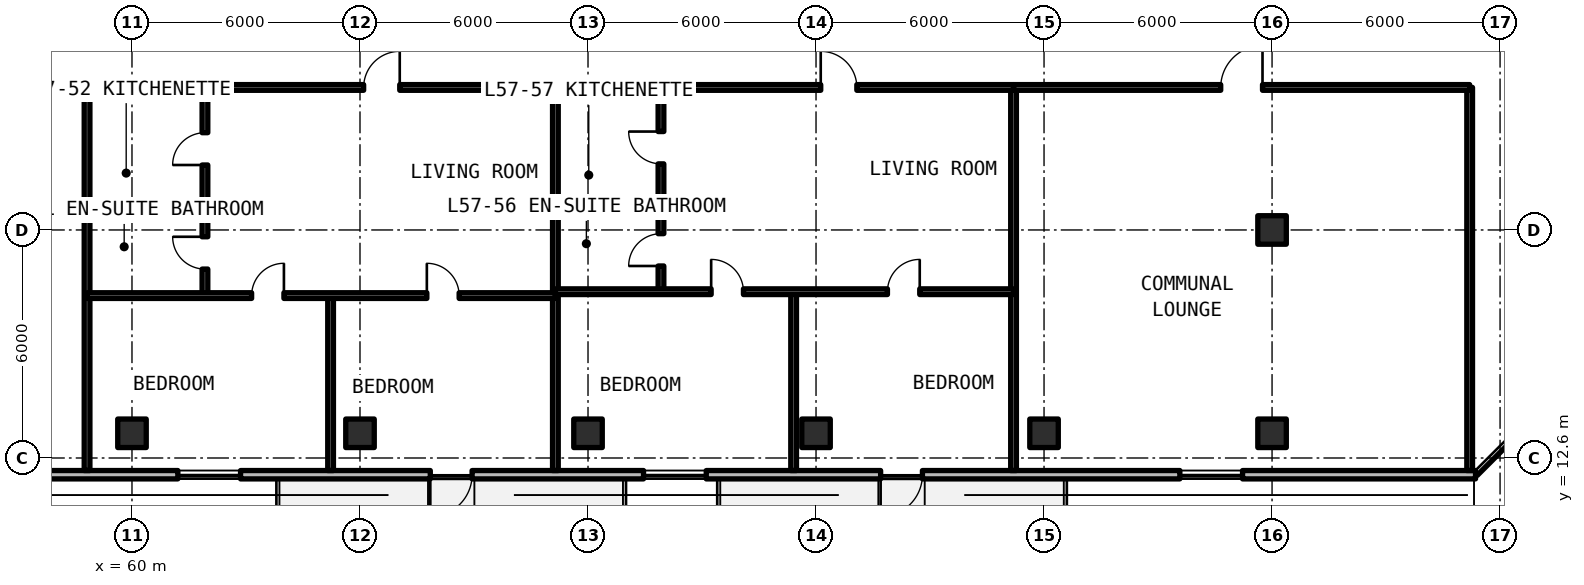
"""IFC4 building model, lengths in metres.
Left out: names, types, materials, properties, quantities, classifications, styles, units other than length and angle.
Written with IfcOpenShell. Run it as: python <this file> out.ifc"""

import sys

from ifc_helpers import new_model, si_unit, direction, frame, frame_2d, origin, origin_2d, place, context, subcontext, project, spatial, rectangle, extrude, element, fill, save


model = new_model("IFC4")
c1 = context("Model", 3, precision=1e-05, world=origin(), true_north=direction((0.0, 1.0)))
c2 = subcontext(c1, "Body", "Model", "MODEL_VIEW")
j1 = project(units=[si_unit("LENGTHUNIT", "METRE"), si_unit("PLANEANGLEUNIT", "RADIAN")], contexts=[c1])
p1 = place(None, origin())
s1 = spatial("IfcSite", under=j1, at=p1, CompositionType="ELEMENT")
p2 = place(p1, origin())
s2 = spatial("IfcBuilding", under=s1, at=p2, CompositionType="ELEMENT")
p3 = place(p2, frame((0.0, 0.0, 204.93)))
s3 = spatial("IfcBuildingStorey", under=s2, at=p3, CompositionType="ELEMENT", Elevation=204.93)
for number, where, z_axis, x_axis in (
    (1, (90.0, 18.6, 0.0), (0.0, 0.0, 1.0), (1.0, 0.0, 0.0)),
    (2, (60.0, 13.25, 0.0), (0.0, 0.0, 1.0), (1.0, 0.0, 0.0)),
    (3, (66.0, 13.25, 0.0), (0.0, 0.0, 1.0), (1.0, 0.0, 0.0)),
    (4, (72.0, 13.25, 0.0), (0.0, 0.0, 1.0), (1.0, 0.0, 0.0)),
    (5, (78.0, 13.25, 0.0), (0.0, 0.0, 1.0), (1.0, 0.0, 0.0)),
    (6, (84.0, 13.25, 0.0), (0.0, 0.0, 1.0), (1.0, 0.0, 0.0)),
    (7, (90.0, 13.25, 0.0), (0.0, 0.0, 1.0), (1.0, 0.0, 0.0)),
):
    element("IfcColumn", number, at=place(p3, frame(where, z_axis=z_axis, x_axis=x_axis)), inside=s3, PredefinedType="COLUMN", context=c2, shape_type="SweptSolid", body=[
        extrude(rectangle(XDim=0.75, YDim=0.75, at=origin_2d()), origin(), (0.0, 0.0, 1.0), 3.3),
    ])
p4 = place(p3, frame((52.11, 12.16, 0.0), z_axis=(0.0, 0.0, 1.0), x_axis=(1.0, 0.0, 0.0)))
e8 = element("IfcWall", 8, at=p4, inside=s3, PredefinedType="SOLIDWALL", context=c2, shape_type="SweptSolid", body=[
    extrude(rectangle(XDim=43.244, YDim=0.22, at=frame_2d((21.622, 0.0))), origin(), (0.0, 0.0, 1.0), 3.08),
])
p5 = place(p4, frame((15.74, 0.0, 0.0)))
e9 = element("IfcOpeningElement", 9, at=p5, cuts=e8, PredefinedType="OPENING", context=c2, shape_type="SweptSolid", body=[
    extrude(rectangle(XDim=1.1, YDim=2.15, at=frame_2d((0.55, 1.075))), frame((0.0, 0.12, 0.0), z_axis=(0.0, -1.0, 0.0), x_axis=(1.0, 0.0, 0.0)), (0.0, 0.0, 1.0), 0.24),
])
p6 = place(p4, frame((27.59, 0.0, 0.0)))
e10 = element("IfcOpeningElement", 10, at=p6, cuts=e8, PredefinedType="OPENING", context=c2, shape_type="SweptSolid", body=[
    extrude(rectangle(XDim=1.1, YDim=2.15, at=frame_2d((0.55, 1.075))), frame((0.0, 0.12, 0.0), z_axis=(0.0, -1.0, 0.0), x_axis=(1.0, 0.0, 0.0)), (0.0, 0.0, 1.0), 0.24),
])
p7 = place(p4, frame((2.694, 0.0, 0.78)))
e11 = element("IfcOpeningElement", 11, at=p7, cuts=e8, PredefinedType="OPENING", context=c2, shape_type="SweptSolid", body=[
    extrude(rectangle(XDim=1.65, YDim=1.66, at=frame_2d((0.825, 0.83))), frame((0.0, 0.12, 0.0), z_axis=(0.0, -1.0, 0.0), x_axis=(1.0, 0.0, 0.0)), (0.0, 0.0, 1.0), 0.24),
])
p8 = place(p4, frame((9.097, 0.0, 0.78)))
e12 = element("IfcOpeningElement", 12, at=p8, cuts=e8, PredefinedType="OPENING", context=c2, shape_type="SweptSolid", body=[
    extrude(rectangle(XDim=1.65, YDim=1.66, at=frame_2d((0.825, 0.83))), frame((0.0, 0.12, 0.0), z_axis=(0.0, -1.0, 0.0), x_axis=(1.0, 0.0, 0.0)), (0.0, 0.0, 1.0), 0.24),
])
p9 = place(p4, frame((21.351, 0.0, 0.78)))
e13 = element("IfcOpeningElement", 13, at=p9, cuts=e8, PredefinedType="OPENING", context=c2, shape_type="SweptSolid", body=[
    extrude(rectangle(XDim=1.65, YDim=1.66, at=frame_2d((0.825, 0.83))), frame((0.0, 0.12, 0.0), z_axis=(0.0, -1.0, 0.0), x_axis=(1.0, 0.0, 0.0)), (0.0, 0.0, 1.0), 0.24),
])
p10 = place(p4, frame((35.464, 0.0, 0.78)))
e14 = element("IfcOpeningElement", 14, at=p10, cuts=e8, PredefinedType="OPENING", context=c2, shape_type="SweptSolid", body=[
    extrude(rectangle(XDim=1.65, YDim=1.66, at=frame_2d((0.825, 0.83))), frame((0.0, 0.12, 0.0), z_axis=(0.0, -1.0, 0.0), x_axis=(1.0, 0.0, 0.0)), (0.0, 0.0, 1.0), 0.24),
])
for number, where, z_axis, x_axis in (
    (15, (95.2, 12.27, 0.0), (0.0, 0.0, 1.0), (0.0, 1.0, 0.0)),
    (16, (58.818, 12.27, 0.0), (0.0, 0.0, 1.0), (0.0, 1.0, 0.0)),
):
    element("IfcWall", number, at=place(p3, frame(where, z_axis=z_axis, x_axis=x_axis)), inside=s3, PredefinedType="SOLIDWALL", context=c2, shape_type="SweptSolid", body=[
        extrude(rectangle(XDim=10.08, YDim=0.15, at=frame_2d((5.04, 0.0))), origin(), (0.0, 0.0, 1.0), 2.35),
    ])
p11 = place(p3, frame((52.12, 22.35, 0.0), z_axis=(0.0, 0.0, 1.0), x_axis=(1.0, 0.0, 0.0)))
e17 = element("IfcWall", 17, at=p11, inside=s3, PredefinedType="SOLIDWALL", context=c2, shape_type="SweptSolid", body=[
    extrude(rectangle(XDim=6.698, YDim=0.15, at=frame_2d((3.349, 0.0))), origin(), (0.0, 0.0, 1.0), 2.35),
])
p12 = place(p11, frame((2.874, 0.0, 0.0)))
e18 = element("IfcOpeningElement", 18, at=p12, cuts=e17, PredefinedType="OPENING", context=c2, shape_type="SweptSolid", body=[
    extrude(rectangle(XDim=0.95, YDim=2.15, at=frame_2d((0.475, 1.075))), frame((0.0, 0.085, 0.0), z_axis=(0.0, -1.0, 0.0), x_axis=(1.0, 0.0, 0.0)), (0.0, 0.0, 1.0), 0.17),
])
p13 = place(p3, frame((71.142, 12.27, 0.0), z_axis=(0.0, 0.0, 1.0), x_axis=(0.0, 1.0, 0.0)))
e19 = element("IfcWall", 19, at=p13, inside=s3, PredefinedType="SOLIDWALL", context=c2, shape_type="SweptSolid", body=[
    extrude(rectangle(XDim=10.08, YDim=0.15, at=frame_2d((5.04, 0.0))), origin(), (0.0, 0.0, 1.0), 2.35),
])
p14 = place(p3, frame((58.818, 19.119, 0.0), z_axis=(0.0, 0.0, 1.0), x_axis=(1.0, 0.0, 0.0)))
e20 = element("IfcWall", 20, at=p14, inside=s3, PredefinedType="PARTITIONING", context=c2, shape_type="SweptSolid", body=[
    extrude(rectangle(XDim=3.102, YDim=0.15, at=frame_2d((1.551, 0.0))), origin(), (0.0, 0.0, 1.0), 2.35),
])
p15 = place(p3, frame((61.92, 16.873, 0.0), z_axis=(0.0, 0.0, 1.0), x_axis=(0.0, 1.0, 0.0)))
e21 = element("IfcWall", 21, at=p15, inside=s3, PredefinedType="PARTITIONING", context=c2, shape_type="SweptSolid", body=[
    extrude(rectangle(XDim=5.477, YDim=0.15, at=frame_2d((2.738, 0.0))), origin(), (0.0, 0.0, 1.0), 2.35),
])
p16 = place(p15, frame((0.698, 0.0, 0.0)))
e22 = element("IfcOpeningElement", 22, at=p16, cuts=e21, PredefinedType="OPENING", context=c2, shape_type="SweptSolid", body=[
    extrude(rectangle(XDim=0.85, YDim=2.1, at=frame_2d((0.425, 1.05))), frame((0.0, 0.085, 0.0), z_axis=(0.0, -1.0, 0.0), x_axis=(1.0, 0.0, 0.0)), (0.0, 0.0, 1.0), 0.17),
])
p17 = place(p15, frame((3.436, 0.0, 0.0)))
e23 = element("IfcOpeningElement", 23, at=p17, cuts=e21, PredefinedType="OPENING", context=c2, shape_type="SweptSolid", body=[
    extrude(rectangle(XDim=0.85, YDim=2.1, at=frame_2d((0.425, 1.05))), frame((0.0, 0.085, 0.0), z_axis=(0.0, -1.0, 0.0), x_axis=(1.0, 0.0, 0.0)), (0.0, 0.0, 1.0), 0.17),
])
p18 = place(p3, frame((65.226, 12.27, 0.0), z_axis=(0.0, 0.0, 1.0), x_axis=(0.0, 1.0, 0.0)))
e24 = element("IfcWall", 24, at=p18, inside=s3, PredefinedType="PARTITIONING", context=c2, shape_type="SweptSolid", body=[
    extrude(rectangle(XDim=4.603, YDim=0.15, at=frame_2d((2.302, 0.0))), origin(), (0.0, 0.0, 1.0), 2.35),
])
p19 = place(p3, frame((58.818, 16.873, 0.0), z_axis=(0.0, 0.0, 1.0), x_axis=(1.0, 0.0, 0.0)))
e25 = element("IfcWall", 25, at=p19, inside=s3, PredefinedType="PARTITIONING", context=c2, shape_type="SweptSolid", body=[
    extrude(rectangle(XDim=12.324, YDim=0.15, at=frame_2d((6.162, 0.0))), origin(), (0.0, 0.0, 1.0), 2.35),
])
p20 = place(p19, frame((4.33, 0.0, 0.0)))
e26 = element("IfcOpeningElement", 26, at=p20, cuts=e25, PredefinedType="OPENING", context=c2, shape_type="SweptSolid", body=[
    extrude(rectangle(XDim=0.85, YDim=2.1, at=frame_2d((0.425, 1.05))), frame((0.0, 0.085, 0.0), z_axis=(0.0, -1.0, 0.0), x_axis=(1.0, 0.0, 0.0)), (0.0, 0.0, 1.0), 0.17),
])
p21 = place(p19, frame((8.941, 0.0, 0.0)))
e27 = element("IfcOpeningElement", 27, at=p21, cuts=e25, PredefinedType="OPENING", context=c2, shape_type="SweptSolid", body=[
    extrude(rectangle(XDim=0.85, YDim=2.1, at=frame_2d((0.425, 1.05))), frame((0.0, 0.085, 0.0), z_axis=(0.0, -1.0, 0.0), x_axis=(1.0, 0.0, 0.0)), (0.0, 0.0, 1.0), 0.17),
])
p22 = place(p3, frame((58.818, 22.35, 0.0), z_axis=(0.0, 0.0, 1.0), x_axis=(1.0, 0.0, 0.0)))
e28 = element("IfcWall", 28, at=p22, inside=s3, PredefinedType="SOLIDWALL", context=c2, shape_type="SweptSolid", body=[
    extrude(rectangle(XDim=12.324, YDim=0.15, at=frame_2d((6.162, 0.0))), origin(), (0.0, 0.0, 1.0), 2.35),
])
p23 = place(p22, frame((7.278, 0.0, 0.0)))
e29 = element("IfcOpeningElement", 29, at=p23, cuts=e28, PredefinedType="OPENING", context=c2, shape_type="SweptSolid", body=[
    extrude(rectangle(XDim=0.95, YDim=2.15, at=frame_2d((0.475, 1.075))), frame((0.0, 0.085, 0.0), z_axis=(0.0, -1.0, 0.0), x_axis=(1.0, 0.0, 0.0)), (0.0, 0.0, 1.0), 0.17),
])
p24 = place(p3, frame((83.198, 12.27, 0.0), z_axis=(0.0, 0.0, 1.0), x_axis=(0.0, 1.0, 0.0)))
e30 = element("IfcWall", 30, at=p24, inside=s3, PredefinedType="SOLIDWALL", context=c2, shape_type="SweptSolid", body=[
    extrude(rectangle(XDim=10.08, YDim=0.15, at=frame_2d((5.04, 0.0))), origin(), (0.0, 0.0, 1.0), 2.35),
])
p25 = place(p3, frame((71.142, 19.179, 0.0), z_axis=(0.0, 0.0, 1.0), x_axis=(1.0, 0.0, 0.0)))
e31 = element("IfcWall", 31, at=p25, inside=s3, PredefinedType="PARTITIONING", context=c2, shape_type="SweptSolid", body=[
    extrude(rectangle(XDim=2.778, YDim=0.15, at=frame_2d((1.389, 0.0))), origin(), (0.0, 0.0, 1.0), 2.35),
])
p26 = place(p3, frame((73.92, 16.976, 0.0), z_axis=(0.0, 0.0, 1.0), x_axis=(0.0, 1.0, 0.0)))
e32 = element("IfcWall", 32, at=p26, inside=s3, PredefinedType="PARTITIONING", context=c2, shape_type="SweptSolid", body=[
    extrude(rectangle(XDim=5.375, YDim=0.15, at=frame_2d((2.687, 0.0))), origin(), (0.0, 0.0, 1.0), 2.35),
])
p27 = place(p26, frame((0.677, 0.0, 0.0)))
e33 = element("IfcOpeningElement", 33, at=p27, cuts=e32, PredefinedType="OPENING", context=c2, shape_type="SweptSolid", body=[
    extrude(rectangle(XDim=0.85, YDim=2.1, at=frame_2d((0.425, 1.05))), frame((0.0, 0.085, 0.0), z_axis=(0.0, -1.0, 0.0), x_axis=(1.0, 0.0, 0.0)), (0.0, 0.0, 1.0), 0.17),
])
p28 = place(p26, frame((3.364, 0.0, 0.0)))
e34 = element("IfcOpeningElement", 34, at=p28, cuts=e32, PredefinedType="OPENING", context=c2, shape_type="SweptSolid", body=[
    extrude(rectangle(XDim=0.85, YDim=2.1, at=frame_2d((0.425, 1.05))), frame((0.0, 0.085, 0.0), z_axis=(0.0, -1.0, 0.0), x_axis=(1.0, 0.0, 0.0)), (0.0, 0.0, 1.0), 0.17),
])
p29 = place(p3, frame((77.411, 12.27, 0.0), z_axis=(0.0, 0.0, 1.0), x_axis=(0.0, 1.0, 0.0)))
e35 = element("IfcWall", 35, at=p29, inside=s3, PredefinedType="PARTITIONING", context=c2, shape_type="SweptSolid", body=[
    extrude(rectangle(XDim=4.706, YDim=0.15, at=frame_2d((2.353, 0.0))), origin(), (0.0, 0.0, 1.0), 2.35),
])
p30 = place(p3, frame((71.142, 16.976, 0.0), z_axis=(0.0, 0.0, 1.0), x_axis=(1.0, 0.0, 0.0)))
e36 = element("IfcWall", 36, at=p30, inside=s3, PredefinedType="PARTITIONING", context=c2, shape_type="SweptSolid", body=[
    extrude(rectangle(XDim=12.056, YDim=0.15, at=frame_2d((6.028, 0.0))), origin(), (0.0, 0.0, 1.0), 2.35),
])
p31 = place(p30, frame((4.099, 0.0, 0.0)))
e37 = element("IfcOpeningElement", 37, at=p31, cuts=e36, PredefinedType="OPENING", context=c2, shape_type="SweptSolid", body=[
    extrude(rectangle(XDim=0.85, YDim=2.1, at=frame_2d((0.425, 1.05))), frame((0.0, 0.085, 0.0), z_axis=(0.0, -1.0, 0.0), x_axis=(1.0, 0.0, 0.0)), (0.0, 0.0, 1.0), 0.17),
])
p32 = place(p30, frame((8.738, 0.0, 0.0)))
e38 = element("IfcOpeningElement", 38, at=p32, cuts=e36, PredefinedType="OPENING", context=c2, shape_type="SweptSolid", body=[
    extrude(rectangle(XDim=0.85, YDim=2.1, at=frame_2d((0.425, 1.05))), frame((0.0, 0.085, 0.0), z_axis=(0.0, -1.0, 0.0), x_axis=(1.0, 0.0, 0.0)), (0.0, 0.0, 1.0), 0.17),
])
p33 = place(p3, frame((71.142, 22.35, 0.0), z_axis=(0.0, 0.0, 1.0), x_axis=(1.0, 0.0, 0.0)))
e39 = element("IfcWall", 39, at=p33, inside=s3, PredefinedType="SOLIDWALL", context=c2, shape_type="SweptSolid", body=[
    extrude(rectangle(XDim=12.056, YDim=0.15, at=frame_2d((6.028, 0.0))), origin(), (0.0, 0.0, 1.0), 2.35),
])
p34 = place(p33, frame((6.982, 0.0, 0.0)))
e40 = element("IfcOpeningElement", 40, at=p34, cuts=e39, PredefinedType="OPENING", context=c2, shape_type="SweptSolid", body=[
    extrude(rectangle(XDim=0.95, YDim=2.15, at=frame_2d((0.475, 1.075))), frame((0.0, 0.085, 0.0), z_axis=(0.0, -1.0, 0.0), x_axis=(1.0, 0.0, 0.0)), (0.0, 0.0, 1.0), 0.17),
])
p35 = place(p3, frame((83.198, 22.35, 0.0), z_axis=(0.0, 0.0, 1.0), x_axis=(1.0, 0.0, 0.0)))
e41 = element("IfcWall", 41, at=p35, inside=s3, PredefinedType="SOLIDWALL", context=c2, shape_type="SweptSolid", body=[
    extrude(rectangle(XDim=12.002, YDim=0.15, at=frame_2d((6.001, 0.0))), origin(), (0.0, 0.0, 1.0), 2.35),
])
p36 = place(p35, frame((5.451, 0.0, 0.0)))
e42 = element("IfcOpeningElement", 42, at=p36, cuts=e41, PredefinedType="OPENING", context=c2, shape_type="SweptSolid", body=[
    extrude(rectangle(XDim=1.1, YDim=2.15, at=frame_2d((0.55, 1.075))), frame((0.0, 0.085, 0.0), z_axis=(0.0, -1.0, 0.0), x_axis=(1.0, 0.0, 0.0)), (0.0, 0.0, 1.0), 0.17),
])
p37 = place(p5, frame((1.1, 0.0, 0.0), z_axis=(0.0, 0.0, 1.0), x_axis=(-1.0, 0.0, 0.0)))
e43 = element("IfcDoor", 43, at=p37, inside=s3, OperationType="SINGLE_SWING_RIGHT", PredefinedType="DOOR", context=c2, shape_type="SweptSolid", body=[
    extrude(rectangle(XDim=1.1, YDim=2.15, at=frame_2d((0.55, 1.075))), frame((0.0, 0.025, 0.0), z_axis=(0.0, -1.0, 0.0), x_axis=(1.0, 0.0, 0.0)), (0.0, 0.0, 1.0), 0.05),
])
fill(e9, e43)
p38 = place(p6, frame((1.1, 0.0, 0.0), z_axis=(0.0, 0.0, 1.0), x_axis=(-1.0, 0.0, 0.0)))
e44 = element("IfcDoor", 44, at=p38, inside=s3, OperationType="SINGLE_SWING_LEFT", PredefinedType="DOOR", context=c2, shape_type="SweptSolid", body=[
    extrude(rectangle(XDim=1.1, YDim=2.15, at=frame_2d((0.55, 1.075))), frame((0.0, 0.025, 0.0), z_axis=(0.0, -1.0, 0.0), x_axis=(1.0, 0.0, 0.0)), (0.0, 0.0, 1.0), 0.05),
])
fill(e10, e44)
p39 = place(p8, origin())
e45 = element("IfcWindow", 45, at=p39, inside=s3, PartitioningType="SINGLE_PANEL", PredefinedType="WINDOW", context=c2, shape_type="SweptSolid", body=[
    extrude(rectangle(XDim=1.65, YDim=1.66, at=frame_2d((0.825, 0.83))), frame((0.0, 0.03, 0.0), z_axis=(0.0, -1.0, 0.0), x_axis=(1.0, 0.0, 0.0)), (0.0, 0.0, 1.0), 0.06),
])
fill(e12, e45)
p40 = place(p9, origin())
e46 = element("IfcWindow", 46, at=p40, inside=s3, PartitioningType="SINGLE_PANEL", PredefinedType="WINDOW", context=c2, shape_type="SweptSolid", body=[
    extrude(rectangle(XDim=1.65, YDim=1.66, at=frame_2d((0.825, 0.83))), frame((0.0, 0.03, 0.0), z_axis=(0.0, -1.0, 0.0), x_axis=(1.0, 0.0, 0.0)), (0.0, 0.0, 1.0), 0.06),
])
fill(e13, e46)
p41 = place(p10, origin())
e47 = element("IfcWindow", 47, at=p41, inside=s3, PartitioningType="SINGLE_PANEL", PredefinedType="WINDOW", context=c2, shape_type="SweptSolid", body=[
    extrude(rectangle(XDim=1.65, YDim=1.66, at=frame_2d((0.825, 0.83))), frame((0.0, 0.03, 0.0), z_axis=(0.0, -1.0, 0.0), x_axis=(1.0, 0.0, 0.0)), (0.0, 0.0, 1.0), 0.06),
])
fill(e14, e47)
p42 = place(p16, origin())
e48 = element("IfcDoor", 48, at=p42, inside=s3, OperationType="SINGLE_SWING_RIGHT", PredefinedType="DOOR", context=c2, shape_type="SweptSolid", body=[
    extrude(rectangle(XDim=0.85, YDim=2.1, at=frame_2d((0.425, 1.05))), frame((0.0, 0.025, 0.0), z_axis=(0.0, -1.0, 0.0), x_axis=(1.0, 0.0, 0.0)), (0.0, 0.0, 1.0), 0.05),
])
fill(e22, e48)
p43 = place(p17, origin())
e49 = element("IfcDoor", 49, at=p43, inside=s3, OperationType="SINGLE_SWING_LEFT", PredefinedType="DOOR", context=c2, shape_type="SweptSolid", body=[
    extrude(rectangle(XDim=0.85, YDim=2.1, at=frame_2d((0.425, 1.05))), frame((0.0, 0.025, 0.0), z_axis=(0.0, -1.0, 0.0), x_axis=(1.0, 0.0, 0.0)), (0.0, 0.0, 1.0), 0.05),
])
fill(e23, e49)
p44 = place(p20, origin())
e50 = element("IfcDoor", 50, at=p44, inside=s3, OperationType="SINGLE_SWING_RIGHT", PredefinedType="DOOR", context=c2, shape_type="SweptSolid", body=[
    extrude(rectangle(XDim=0.85, YDim=2.1, at=frame_2d((0.425, 1.05))), frame((0.0, 0.025, 0.0), z_axis=(0.0, -1.0, 0.0), x_axis=(1.0, 0.0, 0.0)), (0.0, 0.0, 1.0), 0.05),
])
fill(e26, e50)
p45 = place(p21, origin())
e51 = element("IfcDoor", 51, at=p45, inside=s3, OperationType="SINGLE_SWING_LEFT", PredefinedType="DOOR", context=c2, shape_type="SweptSolid", body=[
    extrude(rectangle(XDim=0.85, YDim=2.1, at=frame_2d((0.425, 1.05))), frame((0.0, 0.025, 0.0), z_axis=(0.0, -1.0, 0.0), x_axis=(1.0, 0.0, 0.0)), (0.0, 0.0, 1.0), 0.05),
])
fill(e27, e51)
p46 = place(p23, origin())
e52 = element("IfcDoor", 52, at=p46, inside=s3, OperationType="SINGLE_SWING_RIGHT", PredefinedType="DOOR", context=c2, shape_type="SweptSolid", body=[
    extrude(rectangle(XDim=0.95, YDim=2.15, at=frame_2d((0.475, 1.075))), frame((0.0, 0.025, 0.0), z_axis=(0.0, -1.0, 0.0), x_axis=(1.0, 0.0, 0.0)), (0.0, 0.0, 1.0), 0.05),
])
fill(e29, e52)
p47 = place(p27, origin())
e53 = element("IfcDoor", 53, at=p47, inside=s3, OperationType="SINGLE_SWING_LEFT", PredefinedType="DOOR", context=c2, shape_type="SweptSolid", body=[
    extrude(rectangle(XDim=0.85, YDim=2.1, at=frame_2d((0.425, 1.05))), frame((0.0, 0.025, 0.0), z_axis=(0.0, -1.0, 0.0), x_axis=(1.0, 0.0, 0.0)), (0.0, 0.0, 1.0), 0.05),
])
fill(e33, e53)
p48 = place(p28, origin())
e54 = element("IfcDoor", 54, at=p48, inside=s3, OperationType="SINGLE_SWING_RIGHT", PredefinedType="DOOR", context=c2, shape_type="SweptSolid", body=[
    extrude(rectangle(XDim=0.85, YDim=2.1, at=frame_2d((0.425, 1.05))), frame((0.0, 0.025, 0.0), z_axis=(0.0, -1.0, 0.0), x_axis=(1.0, 0.0, 0.0)), (0.0, 0.0, 1.0), 0.05),
])
fill(e34, e54)
p49 = place(p31, origin())
e55 = element("IfcDoor", 55, at=p49, inside=s3, OperationType="SINGLE_SWING_LEFT", PredefinedType="DOOR", context=c2, shape_type="SweptSolid", body=[
    extrude(rectangle(XDim=0.85, YDim=2.1, at=frame_2d((0.425, 1.05))), frame((0.0, 0.025, 0.0), z_axis=(0.0, -1.0, 0.0), x_axis=(1.0, 0.0, 0.0)), (0.0, 0.0, 1.0), 0.05),
])
fill(e37, e55)
p50 = place(p32, origin())
e56 = element("IfcDoor", 56, at=p50, inside=s3, OperationType="SINGLE_SWING_RIGHT", PredefinedType="DOOR", context=c2, shape_type="SweptSolid", body=[
    extrude(rectangle(XDim=0.85, YDim=2.1, at=frame_2d((0.425, 1.05))), frame((0.0, 0.025, 0.0), z_axis=(0.0, -1.0, 0.0), x_axis=(1.0, 0.0, 0.0)), (0.0, 0.0, 1.0), 0.05),
])
fill(e38, e56)
p51 = place(p34, origin())
e57 = element("IfcDoor", 57, at=p51, inside=s3, OperationType="SINGLE_SWING_LEFT", PredefinedType="DOOR", context=c2, shape_type="SweptSolid", body=[
    extrude(rectangle(XDim=0.95, YDim=2.15, at=frame_2d((0.475, 1.075))), frame((0.0, 0.025, 0.0), z_axis=(0.0, -1.0, 0.0), x_axis=(1.0, 0.0, 0.0)), (0.0, 0.0, 1.0), 0.05),
])
fill(e40, e57)
p52 = place(p36, origin())
e58 = element("IfcDoor", 58, at=p52, inside=s3, OperationType="SINGLE_SWING_RIGHT", PredefinedType="DOOR", context=c2, shape_type="SweptSolid", body=[
    extrude(rectangle(XDim=1.1, YDim=2.15, at=frame_2d((0.55, 1.075))), frame((0.0, 0.025, 0.0), z_axis=(0.0, -1.0, 0.0), x_axis=(1.0, 0.0, 0.0)), (0.0, 0.0, 1.0), 0.05),
])
fill(e42, e58)
save(model, sys.argv[1])
